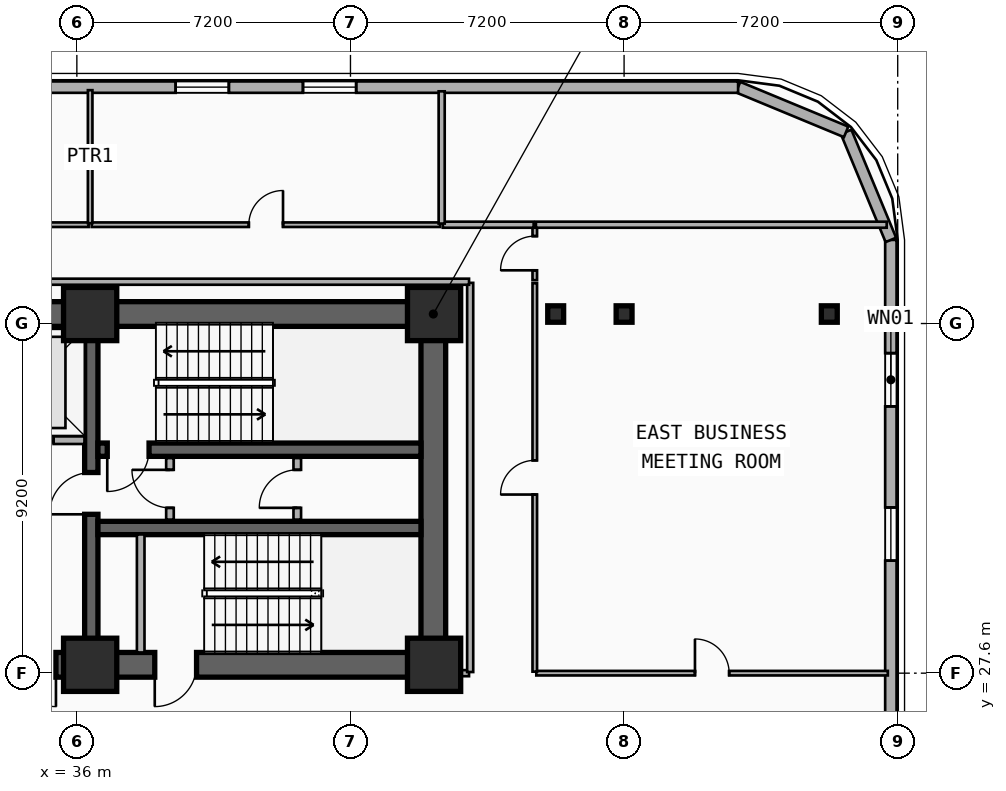
"""IFC4 building model, lengths in metres.
Left out: names, types, materials, properties, quantities, classifications, styles, units other than length and angle.
Written with IfcOpenShell. Run it as: python <this file> out.ifc"""

import sys

from ifc_helpers import new_model, si_unit, direction, frame, frame_2d, origin, origin_2d, place, context, subcontext, project, spatial, rectangle, i_section, extrude, element, fill, save


model = new_model("IFC4")
c1 = context("Model", 3, precision=1e-05, world=origin(), true_north=direction((0.0, 1.0)))
c2 = subcontext(c1, "Body", "Model", "MODEL_VIEW")
j1 = project(units=[si_unit("LENGTHUNIT", "METRE"), si_unit("PLANEANGLEUNIT", "RADIAN")], contexts=[c1])
p1 = place(None, origin())
s1 = spatial("IfcSite", under=j1, at=p1, CompositionType="ELEMENT")
p2 = place(p1, origin())
s2 = spatial("IfcBuilding", under=s1, at=p2, CompositionType="ELEMENT")
p3 = place(p2, frame((0.0, 0.0, 89.8)))
s3 = spatial("IfcBuildingStorey", under=s2, at=p3, CompositionType="ELEMENT", Elevation=89.8)
p4 = place(p3, frame((12.15, 37.05, 0.0), z_axis=(0.0, 0.0, 1.0), x_axis=(1.0, 0.0, 0.0)))
e1 = element("IfcWall", 1, at=p4, inside=s3, PredefinedType="SHEAR", context=c2, shape_type="SweptSolid", body=[
    extrude(rectangle(XDim=33.23, YDim=0.65, at=frame_2d((16.615, 0.0))), origin(), (0.0, 0.0, 1.0), 4.5),
])
p5 = place(p3, frame((45.38, 27.82, 0.0), z_axis=(0.0, 0.0, 1.0), x_axis=(-1.0, 0.0, 0.0)))
e2 = element("IfcWall", 2, at=p5, inside=s3, PredefinedType="SHEAR", context=c2, shape_type="SweptSolid", body=[
    extrude(rectangle(XDim=12.23, YDim=0.65, at=frame_2d((6.115, 0.0))), origin(), (0.0, 0.0, 1.0), 4.5),
])
p6 = place(p5, frame((9.93, 0.0, 0.0)))
e3 = element("IfcOpeningElement", 3, at=p6, cuts=e2, PredefinedType="OPENING", context=c2, shape_type="SweptSolid", body=[
    extrude(rectangle(XDim=1.1, YDim=2.15, at=frame_2d((0.55, 1.075))), frame((0.0, 0.335, 0.0), z_axis=(0.0, -1.0, 0.0), x_axis=(1.0, 0.0, 0.0)), (0.0, 0.0, 1.0), 0.67),
])
p7 = place(p5, frame((6.23, 0.0, 0.0)))
e4 = element("IfcOpeningElement", 4, at=p7, cuts=e2, PredefinedType="OPENING", context=c2, shape_type="SweptSolid", body=[
    extrude(rectangle(XDim=1.1, YDim=2.15, at=frame_2d((0.55, 1.075))), frame((0.0, 0.335, 0.0), z_axis=(0.0, -1.0, 0.0), x_axis=(1.0, 0.0, 0.0)), (0.0, 0.0, 1.0), 0.67),
])
p8 = place(p3, frame((45.38, 28.145, 0.0), z_axis=(0.0, 0.0, 1.0), x_axis=(0.0, 1.0, 0.0)))
e5 = element("IfcWall", 5, at=p8, inside=s3, PredefinedType="SHEAR", context=c2, shape_type="SweptSolid", body=[
    extrude(rectangle(XDim=8.58, YDim=0.65, at=frame_2d((4.29, 0.0))), origin(), (0.0, 0.0, 1.0), 4.5),
])
p9 = place(p3, frame((36.38, 28.145, 0.0), z_axis=(0.0, 0.0, 1.0), x_axis=(0.0, 1.0, 0.0)))
e6 = element("IfcWall", 6, at=p9, inside=s3, PredefinedType="SHEAR", context=c2, shape_type="SweptSolid", body=[
    extrude(rectangle(XDim=8.58, YDim=0.35, at=frame_2d((4.29, 0.0))), origin(), (0.0, 0.0, 1.0), 4.5),
])
p10 = place(p9, frame((3.635, 0.0, 0.0)))
e7 = element("IfcOpeningElement", 7, at=p10, cuts=e6, PredefinedType="OPENING", context=c2, shape_type="SweptSolid", body=[
    extrude(rectangle(XDim=1.1, YDim=2.15, at=frame_2d((0.55, 1.075))), frame((0.0, 0.185, 0.0), z_axis=(0.0, -1.0, 0.0), x_axis=(1.0, 0.0, 0.0)), (0.0, 0.0, 1.0), 0.37),
])
p11 = place(p3, frame((45.055, 33.48, 0.0), z_axis=(0.0, 0.0, 1.0), x_axis=(-1.0, 0.0, 0.0)))
e8 = element("IfcWall", 8, at=p11, inside=s3, PredefinedType="SHEAR", context=c2, shape_type="SweptSolid", body=[
    extrude(rectangle(XDim=8.5, YDim=0.35, at=frame_2d((4.25, 0.0))), origin(), (0.0, 0.0, 1.0), 4.5),
])
p12 = place(p11, frame((7.155, 0.0, 0.0)))
e9 = element("IfcOpeningElement", 9, at=p12, cuts=e8, PredefinedType="OPENING", context=c2, shape_type="SweptSolid", body=[
    extrude(rectangle(XDim=1.1, YDim=2.15, at=frame_2d((0.55, 1.075))), frame((0.0, 0.185, 0.0), z_axis=(0.0, -1.0, 0.0), x_axis=(1.0, 0.0, 0.0)), (0.0, 0.0, 1.0), 0.37),
])
p13 = place(p3, frame((36.555, 31.42, 0.0), z_axis=(0.0, 0.0, 1.0), x_axis=(1.0, 0.0, 0.0)))
e10 = element("IfcWall", 10, at=p13, inside=s3, PredefinedType="SHEAR", context=c2, shape_type="SweptSolid", body=[
    extrude(rectangle(XDim=8.5, YDim=0.35, at=frame_2d((4.25, 0.0))), origin(), (0.0, 0.0, 1.0), 4.5),
])
for number, where, z_axis, x_axis in (
    (11, (36.35, 27.82, 0.0), (0.0, 0.0, 1.0), (1.0, 0.0, 0.0)),
    (12, (36.35, 37.05, 0.0), (0.0, 0.0, 1.0), (1.0, 0.0, 0.0)),
    (13, (45.4, 27.82, 0.0), (0.0, 0.0, 1.0), (1.0, 0.0, 0.0)),
    (14, (45.4, 37.05, 0.0), (0.0, 0.0, 1.0), (1.0, 0.0, 0.0)),
):
    element("IfcColumn", number, at=place(p3, frame(where, z_axis=z_axis, x_axis=x_axis)), inside=s3, PredefinedType="COLUMN", context=c2, shape_type="SweptSolid", body=[
        extrude(rectangle(XDim=1.4, YDim=1.4, at=origin_2d()), origin(), (0.0, 0.0, 1.0), 4.5),
    ])
for number, where, z_axis, x_axis in (
    (15, (48.6, 37.05, 0.0), (0.0, 0.0, 1.0), (1.0, 0.0, 0.0)),
    (16, (50.4, 37.05, 0.0), (0.0, 0.0, 1.0), (1.0, 0.0, 0.0)),
    (17, (55.8, 37.05, 0.0), (0.0, 0.0, 1.0), (1.0, 0.0, 0.0)),
):
    element("IfcColumn", number, at=place(p3, frame(where, z_axis=z_axis, x_axis=x_axis)), inside=s3, PredefinedType="COLUMN", context=c2, shape_type="SweptSolid", body=[
        extrude(i_section(OverallWidth=0.418, OverallDepth=0.432, WebThickness=0.035, FlangeThickness=0.056, FilletRadius=0.015, at=origin_2d()), origin(), (0.0, 0.0, 1.0), 4.5),
    ])
p14 = place(p3, frame((57.42, 39.0, 0.0), z_axis=(0.0, 0.0, 1.0), x_axis=(0.0, -1.0, 0.0)))
e18 = element("IfcWall", 18, at=p14, inside=s3, PredefinedType="SOLIDWALL", context=c2, shape_type="SweptSolid", body=[
    extrude(rectangle(XDim=18.0, YDim=0.3, at=frame_2d((9.0, 0.0))), origin(), (0.0, 0.0, 1.0), 4.24),
])
p15 = place(p14, frame((2.98, 0.0, 0.85)))
e19 = element("IfcOpeningElement", 19, at=p15, cuts=e18, PredefinedType="OPENING", context=c2, shape_type="SweptSolid", body=[
    extrude(rectangle(XDim=1.4, YDim=1.8, at=frame_2d((0.7, 0.9))), frame((0.0, 0.16, 0.0), z_axis=(0.0, -1.0, 0.0), x_axis=(1.0, 0.0, 0.0)), (0.0, 0.0, 1.0), 0.32),
])
p16 = place(p14, frame((7.04, 0.0, 0.85)))
e20 = element("IfcOpeningElement", 20, at=p16, cuts=e18, PredefinedType="OPENING", context=c2, shape_type="SweptSolid", body=[
    extrude(rectangle(XDim=1.4, YDim=1.8, at=frame_2d((0.7, 0.9))), frame((0.0, 0.16, 0.0), z_axis=(0.0, -1.0, 0.0), x_axis=(1.0, 0.0, 0.0)), (0.0, 0.0, 1.0), 0.32),
])
p17 = place(p3, frame((56.243, 41.843, 0.0), z_axis=(0.0, 0.0, 1.0), x_axis=(0.382636798336, -0.92389884758, 0.0)))
e21 = element("IfcWall", 21, at=p17, inside=s3, PredefinedType="SOLIDWALL", context=c2, shape_type="SweptSolid", body=[
    extrude(rectangle(XDim=3.077, YDim=0.3, at=frame_2d((1.538, 0.0))), origin(), (0.0, 0.0, 1.0), 4.24),
])
p18 = place(p3, frame((53.4, 43.02, 0.0), z_axis=(0.0, 0.0, 1.0), x_axis=(0.923882414032, -0.382676475685, 0.0)))
e22 = element("IfcWall", 22, at=p18, inside=s3, PredefinedType="SOLIDWALL", context=c2, shape_type="SweptSolid", body=[
    extrude(rectangle(XDim=3.077, YDim=0.3, at=frame_2d((1.539, 0.0))), origin(), (0.0, 0.0, 1.0), 4.24),
])
p19 = place(p3, frame((4.2, 43.02, 0.0), z_axis=(0.0, 0.0, 1.0), x_axis=(1.0, 0.0, 0.0)))
e23 = element("IfcWall", 23, at=p19, inside=s3, PredefinedType="SOLIDWALL", context=c2, shape_type="SweptSolid", body=[
    extrude(rectangle(XDim=49.2, YDim=0.3, at=frame_2d((24.6, 0.0))), origin(), (0.0, 0.0, 1.0), 4.24),
])
p20 = place(p19, frame((10.067, 0.0, 0.85)))
e24 = element("IfcOpeningElement", 24, at=p20, cuts=e23, PredefinedType="OPENING", context=c2, shape_type="SweptSolid", body=[
    extrude(rectangle(XDim=1.4, YDim=1.8, at=frame_2d((0.7, 0.9))), frame((0.0, 0.16, 0.0), z_axis=(0.0, -1.0, 0.0), x_axis=(1.0, 0.0, 0.0)), (0.0, 0.0, 1.0), 0.32),
])
p21 = place(p19, frame((13.433, 0.0, 0.85)))
e25 = element("IfcOpeningElement", 25, at=p21, cuts=e23, PredefinedType="OPENING", context=c2, shape_type="SweptSolid", body=[
    extrude(rectangle(XDim=1.4, YDim=1.8, at=frame_2d((0.7, 0.9))), frame((0.0, 0.16, 0.0), z_axis=(0.0, -1.0, 0.0), x_axis=(1.0, 0.0, 0.0)), (0.0, 0.0, 1.0), 0.32),
])
p22 = place(p19, frame((34.4, 0.0, 0.85)))
e26 = element("IfcOpeningElement", 26, at=p22, cuts=e23, PredefinedType="OPENING", context=c2, shape_type="SweptSolid", body=[
    extrude(rectangle(XDim=1.4, YDim=1.8, at=frame_2d((0.7, 0.9))), frame((0.0, 0.16, 0.0), z_axis=(0.0, -1.0, 0.0), x_axis=(1.0, 0.0, 0.0)), (0.0, 0.0, 1.0), 0.32),
])
p23 = place(p19, frame((37.75, 0.0, 0.85)))
e27 = element("IfcOpeningElement", 27, at=p23, cuts=e23, PredefinedType="OPENING", context=c2, shape_type="SweptSolid", body=[
    extrude(rectangle(XDim=1.4, YDim=1.8, at=frame_2d((0.7, 0.9))), frame((0.0, 0.16, 0.0), z_axis=(0.0, -1.0, 0.0), x_axis=(1.0, 0.0, 0.0)), (0.0, 0.0, 1.0), 0.32),
])
p24 = place(p3, frame((33.475, 33.73, 0.0), z_axis=(0.0, 0.0, 1.0), x_axis=(1.0, 0.0, 0.0)))
e28 = element("IfcWall", 28, at=p24, inside=s3, PredefinedType="PARTITIONING", context=c2, shape_type="SweptSolid", body=[
    extrude(rectangle(XDim=2.725, YDim=0.2, at=frame_2d((1.362, 0.0))), origin(), (0.0, 0.0, 1.0), 3.212),
])
p25 = place(p24, frame((0.812, 0.0, 0.0)))
e29 = element("IfcOpeningElement", 29, at=p25, cuts=e28, PredefinedType="OPENING", context=c2, shape_type="SweptSolid", body=[
    extrude(rectangle(XDim=1.1, YDim=2.15, at=frame_2d((0.55, 1.075))), frame((0.0, 0.11, 0.0), z_axis=(0.0, -1.0, 0.0), x_axis=(1.0, 0.0, 0.0)), (0.0, 0.0, 1.0), 0.22),
])
p26 = place(p3, frame((37.68, 28.145, 0.0), z_axis=(0.0, 0.0, 1.0), x_axis=(0.0, 1.0, 0.0)))
e30 = element("IfcWall", 30, at=p26, inside=s3, PredefinedType="PARTITIONING", context=c2, shape_type="SweptSolid", body=[
    extrude(rectangle(XDim=3.105, YDim=0.2, at=frame_2d((1.552, 0.0))), origin(), (0.0, 0.0, 1.0), 3.62),
])
p27 = place(p3, frame((38.45, 31.64, 0.0), z_axis=(0.0, 0.0, 1.0), x_axis=(0.0, 1.0, 0.0)))
e31 = element("IfcWall", 31, at=p27, inside=s3, PredefinedType="PARTITIONING", context=c2, shape_type="SweptSolid", body=[
    extrude(rectangle(XDim=1.62, YDim=0.2, at=frame_2d((0.81, 0.0))), origin(), (0.0, 0.0, 1.0), 4.24),
])
p28 = place(p27, frame((0.31, 0.0, 0.0)))
e32 = element("IfcOpeningElement", 32, at=p28, cuts=e31, PredefinedType="OPENING", context=c2, shape_type="SweptSolid", body=[
    extrude(rectangle(XDim=1.0, YDim=2.15, at=frame_2d((0.5, 1.075))), frame((0.0, 0.11, 0.0), z_axis=(0.0, -1.0, 0.0), x_axis=(1.0, 0.0, 0.0)), (0.0, 0.0, 1.0), 0.22),
])
p29 = place(p3, frame((41.8, 31.64, 0.0), z_axis=(0.0, 0.0, 1.0), x_axis=(0.0, 1.0, 0.0)))
e33 = element("IfcWall", 33, at=p29, inside=s3, PredefinedType="PARTITIONING", context=c2, shape_type="SweptSolid", body=[
    extrude(rectangle(XDim=1.62, YDim=0.2, at=frame_2d((0.81, 0.0))), origin(), (0.0, 0.0, 1.0), 4.24),
])
p30 = place(p29, frame((0.31, 0.0, 0.0)))
e34 = element("IfcOpeningElement", 34, at=p30, cuts=e33, PredefinedType="OPENING", context=c2, shape_type="SweptSolid", body=[
    extrude(rectangle(XDim=1.0, YDim=2.15, at=frame_2d((0.5, 1.075))), frame((0.0, 0.11, 0.0), z_axis=(0.0, -1.0, 0.0), x_axis=(1.0, 0.0, 0.0)), (0.0, 0.0, 1.0), 0.22),
])
p31 = place(p3, frame((48.09, 27.6, 0.0), z_axis=(0.0, 0.0, 1.0), x_axis=(1.0, 0.0, 0.0)))
e35 = element("IfcWall", 35, at=p31, inside=s3, PredefinedType="PARTITIONING", context=c2, shape_type="SweptSolid", body=[
    extrude(rectangle(XDim=9.25, YDim=0.12, at=frame_2d((4.625, 0.0))), origin(), (0.0, 0.0, 1.0), 3.57),
])
p32 = place(p31, frame((4.175, 0.0, 0.0)))
e36 = element("IfcOpeningElement", 36, at=p32, cuts=e35, PredefinedType="OPENING", context=c2, shape_type="SweptSolid", body=[
    extrude(rectangle(XDim=0.9, YDim=2.1, at=frame_2d((0.45, 1.05))), frame((0.0, 0.07, 0.0), z_axis=(0.0, -1.0, 0.0), x_axis=(1.0, 0.0, 0.0)), (0.0, 0.0, 1.0), 0.14),
])
p33 = place(p3, frame((48.05, 27.64, 0.0), z_axis=(0.0, 0.0, 1.0), x_axis=(0.0, 1.0, 0.0)))
e37 = element("IfcWall", 37, at=p33, inside=s3, PredefinedType="PARTITIONING", context=c2, shape_type="SweptSolid", body=[
    extrude(rectangle(XDim=10.22, YDim=0.12, at=frame_2d((5.11, 0.0))), origin(), (0.0, 0.0, 1.0), 3.72),
])
p34 = place(p33, frame((4.66, 0.0, 0.0)))
e38 = element("IfcOpeningElement", 38, at=p34, cuts=e37, PredefinedType="OPENING", context=c2, shape_type="SweptSolid", body=[
    extrude(rectangle(XDim=0.9, YDim=2.1, at=frame_2d((0.45, 1.05))), frame((0.0, 0.07, 0.0), z_axis=(0.0, -1.0, 0.0), x_axis=(1.0, 0.0, 0.0)), (0.0, 0.0, 1.0), 0.14),
])
p35 = place(p3, frame((48.05, 37.94, 0.0), z_axis=(0.0, 0.0, 1.0), x_axis=(0.0, 1.0, 0.0)))
e39 = element("IfcWall", 39, at=p35, inside=s3, PredefinedType="PARTITIONING", context=c2, shape_type="SweptSolid", body=[
    extrude(rectangle(XDim=1.42, YDim=0.12, at=frame_2d((0.71, 0.0))), origin(), (0.0, 0.0, 1.0), 4.24),
])
p36 = place(p35, frame((0.26, 0.0, 0.0)))
e40 = element("IfcOpeningElement", 40, at=p36, cuts=e39, PredefinedType="OPENING", context=c2, shape_type="SweptSolid", body=[
    extrude(rectangle(XDim=0.9, YDim=2.1, at=frame_2d((0.45, 1.05))), frame((0.0, 0.07, 0.0), z_axis=(0.0, -1.0, 0.0), x_axis=(1.0, 0.0, 0.0)), (0.0, 0.0, 1.0), 0.14),
])
p37 = place(p3, frame((21.34, 39.4, 0.0), z_axis=(0.0, 0.0, 1.0), x_axis=(1.0, 0.0, 0.0)))
e41 = element("IfcWall", 41, at=p37, inside=s3, PredefinedType="PARTITIONING", context=c2, shape_type="SweptSolid", body=[
    extrude(rectangle(XDim=14.97, YDim=0.12, at=frame_2d((7.485, 0.0))), origin(), (0.0, 0.0, 1.0), 4.24),
])
p38 = place(p37, frame((7.035, 0.0, 0.0)))
e42 = element("IfcOpeningElement", 42, at=p38, cuts=e41, PredefinedType="OPENING", context=c2, shape_type="SweptSolid", body=[
    extrude(rectangle(XDim=0.9, YDim=2.1, at=frame_2d((0.45, 1.05))), frame((0.0, 0.07, 0.0), z_axis=(0.0, -1.0, 0.0), x_axis=(1.0, 0.0, 0.0)), (0.0, 0.0, 1.0), 0.14),
])
p39 = place(p3, frame((36.39, 39.4, 0.0), z_axis=(0.0, 0.0, 1.0), x_axis=(1.0, 0.0, 0.0)))
e43 = element("IfcWall", 43, at=p39, inside=s3, PredefinedType="PARTITIONING", context=c2, shape_type="SweptSolid", body=[
    extrude(rectangle(XDim=9.17, YDim=0.12, at=frame_2d((4.585, 0.0))), origin(), (0.0, 0.0, 1.0), 4.24),
])
p40 = place(p39, frame((4.135, 0.0, 0.0)))
e44 = element("IfcOpeningElement", 44, at=p40, cuts=e43, PredefinedType="OPENING", context=c2, shape_type="SweptSolid", body=[
    extrude(rectangle(XDim=0.9, YDim=2.1, at=frame_2d((0.45, 1.05))), frame((0.0, 0.07, 0.0), z_axis=(0.0, -1.0, 0.0), x_axis=(1.0, 0.0, 0.0)), (0.0, 0.0, 1.0), 0.14),
])
p41 = place(p3, frame((36.35, 39.44, 0.0), z_axis=(0.0, 0.0, 1.0), x_axis=(0.0, 1.0, 0.0)))
e45 = element("IfcWall", 45, at=p41, inside=s3, PredefinedType="PARTITIONING", context=c2, shape_type="SweptSolid", body=[
    extrude(rectangle(XDim=3.5, YDim=0.12, at=frame_2d((1.75, 0.0))), origin(), (0.0, 0.0, 1.0), 4.24),
])
p42 = place(p3, frame((45.41, 27.6, 0.0), z_axis=(0.0, 0.0, 1.0), x_axis=(1.0, 0.0, 0.0)))
e46 = element("IfcWall", 46, at=p42, inside=s3, PredefinedType="PARTITIONING", context=c2, shape_type="SweptSolid", body=[
    extrude(rectangle(XDim=0.91, YDim=0.16, at=frame_2d((0.455, 0.0))), origin(), (0.0, 0.0, 1.0), 3.212),
])
p43 = place(p3, frame((46.35, 27.63, 0.0), z_axis=(0.0, 0.0, 1.0), x_axis=(0.0, 1.0, 0.0)))
e47 = element("IfcWall", 47, at=p43, inside=s3, PredefinedType="PARTITIONING", context=c2, shape_type="SweptSolid", body=[
    extrude(rectangle(XDim=10.24, YDim=0.16, at=frame_2d((5.12, 0.0))), origin(), (0.0, 0.0, 1.0), 3.72),
])
p44 = place(p3, frame((11.28, 37.9, 0.0), z_axis=(0.0, 0.0, 1.0), x_axis=(1.0, 0.0, 0.0)))
e48 = element("IfcWall", 48, at=p44, inside=s3, PredefinedType="PARTITIONING", context=c2, shape_type="SweptSolid", body=[
    extrude(rectangle(XDim=35.04, YDim=0.16, at=frame_2d((17.52, 0.0))), origin(), (0.0, 0.0, 1.0), 4.24),
])
p45 = place(p3, frame((45.63, 39.4, 0.0), z_axis=(0.0, 0.0, 1.0), x_axis=(1.0, 0.0, 0.0)))
e49 = element("IfcWall", 49, at=p45, inside=s3, PredefinedType="PARTITIONING", context=c2, shape_type="SweptSolid", body=[
    extrude(rectangle(XDim=2.39, YDim=0.16, at=frame_2d((1.195, 0.0))), origin(), (0.0, 0.0, 1.0), 4.24),
])
p46 = place(p3, frame((48.08, 39.4, 0.0), z_axis=(0.0, 0.0, 1.0), x_axis=(1.0, 0.0, 0.0)))
e50 = element("IfcWall", 50, at=p46, inside=s3, PredefinedType="PARTITIONING", context=c2, shape_type="SweptSolid", body=[
    extrude(rectangle(XDim=9.23, YDim=0.16, at=frame_2d((4.615, 0.0))), origin(), (0.0, 0.0, 1.0), 4.24),
])
p47 = place(p3, frame((45.6, 39.43, 0.0), z_axis=(0.0, 0.0, 1.0), x_axis=(0.0, 1.0, 0.0)))
e51 = element("IfcWall", 51, at=p47, inside=s3, PredefinedType="PARTITIONING", context=c2, shape_type="SweptSolid", body=[
    extrude(rectangle(XDim=3.48, YDim=0.16, at=frame_2d((1.74, 0.0))), origin(), (0.0, 0.0, 1.0), 4.24),
])
p48 = place(p15, origin())
e52 = element("IfcWindow", 52, at=p48, inside=s3, PartitioningType="SINGLE_PANEL", PredefinedType="WINDOW", context=c2, shape_type="SweptSolid", body=[
    extrude(rectangle(XDim=1.4, YDim=1.8, at=frame_2d((0.7, 0.9))), frame((0.0, 0.03, 0.0), z_axis=(0.0, -1.0, 0.0), x_axis=(1.0, 0.0, 0.0)), (0.0, 0.0, 1.0), 0.06),
])
fill(e19, e52)
p49 = place(p16, origin())
e53 = element("IfcWindow", 53, at=p49, inside=s3, PartitioningType="SINGLE_PANEL", PredefinedType="WINDOW", context=c2, shape_type="SweptSolid", body=[
    extrude(rectangle(XDim=1.4, YDim=1.8, at=frame_2d((0.7, 0.9))), frame((0.0, 0.03, 0.0), z_axis=(0.0, -1.0, 0.0), x_axis=(1.0, 0.0, 0.0)), (0.0, 0.0, 1.0), 0.06),
])
fill(e20, e53)
p50 = place(p22, origin())
e54 = element("IfcWindow", 54, at=p50, inside=s3, PartitioningType="SINGLE_PANEL", PredefinedType="WINDOW", context=c2, shape_type="SweptSolid", body=[
    extrude(rectangle(XDim=1.4, YDim=1.8, at=frame_2d((0.7, 0.9))), frame((0.0, 0.03, 0.0), z_axis=(0.0, -1.0, 0.0), x_axis=(1.0, 0.0, 0.0)), (0.0, 0.0, 1.0), 0.06),
])
fill(e26, e54)
p51 = place(p23, origin())
e55 = element("IfcWindow", 55, at=p51, inside=s3, PartitioningType="SINGLE_PANEL", PredefinedType="WINDOW", context=c2, shape_type="SweptSolid", body=[
    extrude(rectangle(XDim=1.4, YDim=1.8, at=frame_2d((0.7, 0.9))), frame((0.0, 0.03, 0.0), z_axis=(0.0, -1.0, 0.0), x_axis=(1.0, 0.0, 0.0)), (0.0, 0.0, 1.0), 0.06),
])
fill(e27, e55)
p52 = place(p25, origin())
e56 = element("IfcDoor", 56, at=p52, inside=s3, OperationType="DOUBLE_DOOR_SLIDING", PredefinedType="DOOR", context=c2, shape_type="SweptSolid", body=[
    extrude(rectangle(XDim=1.1, YDim=2.15, at=frame_2d((0.55, 1.075))), frame((0.0, 0.025, 0.0), z_axis=(0.0, -1.0, 0.0), x_axis=(1.0, 0.0, 0.0)), (0.0, 0.0, 1.0), 0.05),
])
fill(e29, e56)
p53 = place(p12, origin())
e57 = element("IfcDoor", 57, at=p53, inside=s3, OperationType="SINGLE_SWING_RIGHT", PredefinedType="DOOR", context=c2, shape_type="SweptSolid", body=[
    extrude(rectangle(XDim=1.1, YDim=2.15, at=frame_2d((0.55, 1.075))), frame((0.0, 0.025, 0.0), z_axis=(0.0, -1.0, 0.0), x_axis=(1.0, 0.0, 0.0)), (0.0, 0.0, 1.0), 0.05),
])
fill(e9, e57)
p54 = place(p10, origin())
e58 = element("IfcDoor", 58, at=p54, inside=s3, OperationType="SINGLE_SWING_LEFT", PredefinedType="DOOR", context=c2, shape_type="SweptSolid", body=[
    extrude(rectangle(XDim=1.1, YDim=2.15, at=frame_2d((0.55, 1.075))), frame((0.0, 0.025, 0.0), z_axis=(0.0, -1.0, 0.0), x_axis=(1.0, 0.0, 0.0)), (0.0, 0.0, 1.0), 0.05),
])
fill(e7, e58)
p55 = place(p6, origin())
e59 = element("IfcDoor", 59, at=p55, inside=s3, OperationType="SINGLE_SWING_LEFT", PredefinedType="DOOR", context=c2, shape_type="SweptSolid", body=[
    extrude(rectangle(XDim=1.1, YDim=2.15, at=frame_2d((0.55, 1.075))), frame((0.0, 0.025, 0.0), z_axis=(0.0, -1.0, 0.0), x_axis=(1.0, 0.0, 0.0)), (0.0, 0.0, 1.0), 0.05),
])
fill(e3, e59)
p56 = place(p7, origin())
e60 = element("IfcDoor", 60, at=p56, inside=s3, OperationType="SINGLE_SWING_RIGHT", PredefinedType="DOOR", context=c2, shape_type="SweptSolid", body=[
    extrude(rectangle(XDim=1.1, YDim=2.15, at=frame_2d((0.55, 1.075))), frame((0.0, 0.025, 0.0), z_axis=(0.0, -1.0, 0.0), x_axis=(1.0, 0.0, 0.0)), (0.0, 0.0, 1.0), 0.05),
])
fill(e4, e60)
p57 = place(p28, origin())
e61 = element("IfcDoor", 61, at=p57, inside=s3, OperationType="SINGLE_SWING_RIGHT", PredefinedType="DOOR", context=c2, shape_type="SweptSolid", body=[
    extrude(rectangle(XDim=1.0, YDim=2.15, at=frame_2d((0.5, 1.075))), frame((0.0, 0.025, 0.0), z_axis=(0.0, -1.0, 0.0), x_axis=(1.0, 0.0, 0.0)), (0.0, 0.0, 1.0), 0.05),
])
fill(e32, e61)
p58 = place(p30, origin())
e62 = element("IfcDoor", 62, at=p58, inside=s3, OperationType="SINGLE_SWING_LEFT", PredefinedType="DOOR", context=c2, shape_type="SweptSolid", body=[
    extrude(rectangle(XDim=1.0, YDim=2.15, at=frame_2d((0.5, 1.075))), frame((0.0, 0.025, 0.0), z_axis=(0.0, -1.0, 0.0), x_axis=(1.0, 0.0, 0.0)), (0.0, 0.0, 1.0), 0.05),
])
fill(e34, e62)
p59 = place(p32, origin())
e63 = element("IfcDoor", 63, at=p59, inside=s3, OperationType="SINGLE_SWING_LEFT", PredefinedType="DOOR", context=c2, shape_type="SweptSolid", body=[
    extrude(rectangle(XDim=0.9, YDim=2.1, at=frame_2d((0.45, 1.05))), frame((0.0, 0.025, 0.0), z_axis=(0.0, -1.0, 0.0), x_axis=(1.0, 0.0, 0.0)), (0.0, 0.0, 1.0), 0.05),
])
fill(e36, e63)
p60 = place(p34, origin())
e64 = element("IfcDoor", 64, at=p60, inside=s3, OperationType="SINGLE_SWING_LEFT", PredefinedType="DOOR", context=c2, shape_type="SweptSolid", body=[
    extrude(rectangle(XDim=0.9, YDim=2.1, at=frame_2d((0.45, 1.05))), frame((0.0, 0.025, 0.0), z_axis=(0.0, -1.0, 0.0), x_axis=(1.0, 0.0, 0.0)), (0.0, 0.0, 1.0), 0.05),
])
fill(e38, e64)
p61 = place(p36, origin())
e65 = element("IfcDoor", 65, at=p61, inside=s3, OperationType="SINGLE_SWING_LEFT", PredefinedType="DOOR", context=c2, shape_type="SweptSolid", body=[
    extrude(rectangle(XDim=0.9, YDim=2.1, at=frame_2d((0.45, 1.05))), frame((0.0, 0.025, 0.0), z_axis=(0.0, -1.0, 0.0), x_axis=(1.0, 0.0, 0.0)), (0.0, 0.0, 1.0), 0.05),
])
fill(e40, e65)
p62 = place(p40, origin())
e66 = element("IfcDoor", 66, at=p62, inside=s3, OperationType="SINGLE_SWING_RIGHT", PredefinedType="DOOR", context=c2, shape_type="SweptSolid", body=[
    extrude(rectangle(XDim=0.9, YDim=2.1, at=frame_2d((0.45, 1.05))), frame((0.0, 0.025, 0.0), z_axis=(0.0, -1.0, 0.0), x_axis=(1.0, 0.0, 0.0)), (0.0, 0.0, 1.0), 0.05),
])
fill(e44, e66)
save(model, sys.argv[1])
